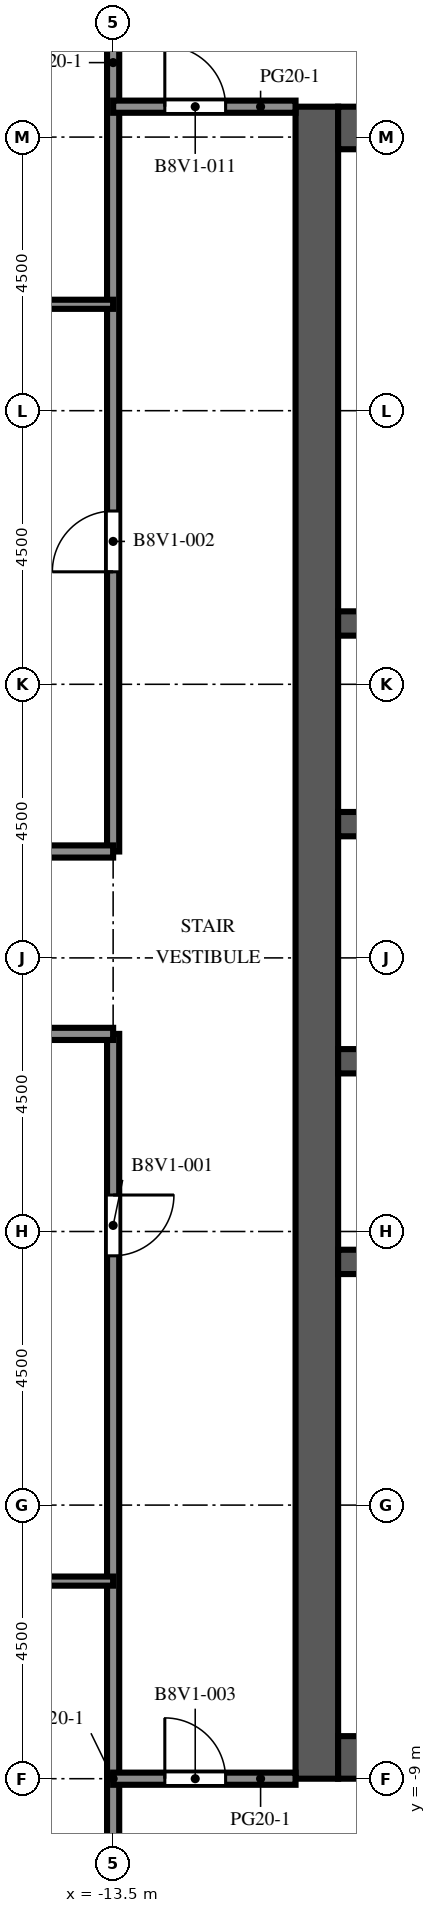
"""IFC4 building model, lengths in metres.
Left out: names, types, materials, properties, quantities, classifications, styles, units other than length and angle.
Written with IfcOpenShell. Run it as: python <this file> out.ifc"""

import sys

from ifc_helpers import new_model, si_unit, direction, frame, frame_2d, origin, place, context, subcontext, project, spatial, rectangle, extrude, element, fill, save


model = new_model("IFC4")
c1 = context("Model", 3, precision=1e-05, world=origin(), true_north=direction((0.0, 1.0)))
c2 = subcontext(c1, "Body", "Model", "MODEL_VIEW")
j1 = project(units=[si_unit("LENGTHUNIT", "METRE"), si_unit("PLANEANGLEUNIT", "RADIAN")], contexts=[c1])
p1 = place(None, origin())
s1 = spatial("IfcSite", under=j1, at=p1, CompositionType="ELEMENT")
p2 = place(p1, origin())
s2 = spatial("IfcBuilding", under=s1, at=p2, CompositionType="ELEMENT")
p3 = place(p2, frame((0.0, 0.0, 278.6)))
s3 = spatial("IfcBuildingStorey", under=s2, at=p3, CompositionType="ELEMENT", Elevation=278.6)
p4 = place(p3, frame((-10.15, -9.0, 0.0), z_axis=(0.0, 0.0, 1.0), x_axis=(0.0, 1.0, 0.0)))
e1 = element("IfcWall", 1, at=p4, inside=s3, PredefinedType="SHEAR", context=c2, shape_type="SweptSolid", body=[
    extrude(rectangle(XDim=27.5, YDim=0.7, at=frame_2d((13.75, 0.0))), origin(), (0.0, 0.0, 1.0), 4.1),
])
p5 = place(p4, frame((12.55, 0.0, 0.0)))
e2 = element("IfcOpeningElement", 2, at=p5, cuts=e1, PredefinedType="OPENING", context=c2, shape_type="SweptSolid", body=[
    extrude(rectangle(XDim=2.4, YDim=2.4, at=frame_2d((1.2, 1.2))), frame((0.0, 0.36, 0.0), z_axis=(0.0, -1.0, 0.0), x_axis=(1.0, 0.0, 0.0)), (0.0, 0.0, 1.0), 0.72),
])
p6 = place(p4, frame((6.825, 0.0, 0.0)))
e3 = element("IfcOpeningElement", 3, at=p6, cuts=e1, PredefinedType="OPENING", context=c2, shape_type="SweptSolid", body=[
    extrude(rectangle(XDim=1.2, YDim=2.1, at=frame_2d((0.6, 1.05))), frame((0.0, 0.36, 0.0), z_axis=(0.0, -1.0, 0.0), x_axis=(1.0, 0.0, 0.0)), (0.0, 0.0, 1.0), 0.72),
])
p7 = place(p4, frame((19.475, 0.0, 0.0)))
e4 = element("IfcOpeningElement", 4, at=p7, cuts=e1, PredefinedType="OPENING", context=c2, shape_type="SweptSolid", body=[
    extrude(rectangle(XDim=1.2, YDim=2.1, at=frame_2d((0.6, 1.05))), frame((0.0, 0.36, 0.0), z_axis=(0.0, -1.0, 0.0), x_axis=(1.0, 0.0, 0.0)), (0.0, 0.0, 1.0), 0.72),
])
for number, where, z_axis, x_axis in (
    (5, (-9.8, -8.65, 0.0), (0.0, 0.0, 1.0), (1.0, 0.0, 0.0)),
    (6, (-9.8, 18.15, 0.0), (0.0, 0.0, 1.0), (1.0, 0.0, 0.0)),
):
    element("IfcWall", number, at=place(p3, frame(where, z_axis=z_axis, x_axis=x_axis)), inside=s3, PredefinedType="SHEAR", context=c2, shape_type="SweptSolid", body=[
        extrude(rectangle(XDim=10.6, YDim=0.7, at=frame_2d((5.3, 0.0))), origin(), (0.0, 0.0, 1.0), 4.1),
    ])
p8 = place(p3, frame((-9.8, -0.5, 0.0), z_axis=(0.0, 0.0, 1.0), x_axis=(1.0, 0.0, 0.0)))
e7 = element("IfcWall", 7, at=p8, inside=s3, PredefinedType="SHEAR", context=c2, shape_type="SweptSolid", body=[
    extrude(rectangle(XDim=10.6, YDim=0.4, at=frame_2d((5.3, 0.0))), origin(), (0.0, 0.0, 1.0), 4.1),
])
p9 = place(p3, frame((-9.8, 2.8, 0.0), z_axis=(0.0, 0.0, 1.0), x_axis=(1.0, 0.0, 0.0)))
e8 = element("IfcWall", 8, at=p9, inside=s3, PredefinedType="SHEAR", context=c2, shape_type="SweptSolid", body=[
    extrude(rectangle(XDim=10.6, YDim=0.4, at=frame_2d((5.3, 0.0))), origin(), (0.0, 0.0, 1.0), 4.1),
])
p10 = place(p9, frame((0.688, 0.0, 0.0)))
e9 = element("IfcOpeningElement", 9, at=p10, cuts=e8, PredefinedType="OPENING", context=c2, shape_type="SweptSolid", body=[
    extrude(rectangle(XDim=1.1, YDim=2.1, at=frame_2d((0.55, 1.05))), frame((0.0, 0.21, 0.0), z_axis=(0.0, -1.0, 0.0), x_axis=(1.0, 0.0, 0.0)), (0.0, 0.0, 1.0), 0.42),
])
p11 = place(p9, frame((3.438, 0.0, 0.0)))
e10 = element("IfcOpeningElement", 10, at=p11, cuts=e8, PredefinedType="OPENING", context=c2, shape_type="SweptSolid", body=[
    extrude(rectangle(XDim=1.1, YDim=2.1, at=frame_2d((0.55, 1.05))), frame((0.0, 0.21, 0.0), z_axis=(0.0, -1.0, 0.0), x_axis=(1.0, 0.0, 0.0)), (0.0, 0.0, 1.0), 0.42),
])
p12 = place(p9, frame((6.113, 0.0, 0.0)))
e11 = element("IfcOpeningElement", 11, at=p12, cuts=e8, PredefinedType="OPENING", context=c2, shape_type="SweptSolid", body=[
    extrude(rectangle(XDim=1.0, YDim=2.1, at=frame_2d((0.5, 1.05))), frame((0.0, 0.21, 0.0), z_axis=(0.0, -1.0, 0.0), x_axis=(1.0, 0.0, 0.0)), (0.0, 0.0, 1.0), 0.42),
])
p13 = place(p9, frame((8.863, 0.0, 0.0)))
e12 = element("IfcOpeningElement", 12, at=p13, cuts=e8, PredefinedType="OPENING", context=c2, shape_type="SweptSolid", body=[
    extrude(rectangle(XDim=1.0, YDim=2.1, at=frame_2d((0.5, 1.05))), frame((0.0, 0.21, 0.0), z_axis=(0.0, -1.0, 0.0), x_axis=(1.0, 0.0, 0.0)), (0.0, 0.0, 1.0), 0.42),
])
p14 = place(p3, frame((-9.8, 6.7, 0.0), z_axis=(0.0, 0.0, 1.0), x_axis=(1.0, 0.0, 0.0)))
e13 = element("IfcWall", 13, at=p14, inside=s3, PredefinedType="SHEAR", context=c2, shape_type="SweptSolid", body=[
    extrude(rectangle(XDim=10.6, YDim=0.4, at=frame_2d((5.3, 0.0))), origin(), (0.0, 0.0, 1.0), 4.1),
])
p15 = place(p14, frame((3.438, 0.0, 0.0)))
e14 = element("IfcOpeningElement", 14, at=p15, cuts=e13, PredefinedType="OPENING", context=c2, shape_type="SweptSolid", body=[
    extrude(rectangle(XDim=1.1, YDim=2.1, at=frame_2d((0.55, 1.05))), frame((0.0, 0.21, 0.0), z_axis=(0.0, -1.0, 0.0), x_axis=(1.0, 0.0, 0.0)), (0.0, 0.0, 1.0), 0.42),
])
p16 = place(p14, frame((6.062, 0.0, 0.0)))
e15 = element("IfcOpeningElement", 15, at=p16, cuts=e13, PredefinedType="OPENING", context=c2, shape_type="SweptSolid", body=[
    extrude(rectangle(XDim=1.1, YDim=2.1, at=frame_2d((0.55, 1.05))), frame((0.0, 0.21, 0.0), z_axis=(0.0, -1.0, 0.0), x_axis=(1.0, 0.0, 0.0)), (0.0, 0.0, 1.0), 0.42),
])
p17 = place(p14, frame((8.812, 0.0, 0.0)))
e16 = element("IfcOpeningElement", 16, at=p17, cuts=e13, PredefinedType="OPENING", context=c2, shape_type="SweptSolid", body=[
    extrude(rectangle(XDim=1.1, YDim=2.1, at=frame_2d((0.55, 1.05))), frame((0.0, 0.21, 0.0), z_axis=(0.0, -1.0, 0.0), x_axis=(1.0, 0.0, 0.0)), (0.0, 0.0, 1.0), 0.42),
])
p18 = place(p14, frame((0.738, 0.0, 0.0)))
e17 = element("IfcOpeningElement", 17, at=p18, cuts=e13, PredefinedType="OPENING", context=c2, shape_type="SweptSolid", body=[
    extrude(rectangle(XDim=1.0, YDim=2.1, at=frame_2d((0.5, 1.05))), frame((0.0, 0.21, 0.0), z_axis=(0.0, -1.0, 0.0), x_axis=(1.0, 0.0, 0.0)), (0.0, 0.0, 1.0), 0.42),
])
p19 = place(p3, frame((-9.8, 10.0, 0.0), z_axis=(0.0, 0.0, 1.0), x_axis=(1.0, 0.0, 0.0)))
e18 = element("IfcWall", 18, at=p19, inside=s3, PredefinedType="SHEAR", context=c2, shape_type="SweptSolid", body=[
    extrude(rectangle(XDim=10.6, YDim=0.4, at=frame_2d((5.3, 0.0))), origin(), (0.0, 0.0, 1.0), 4.1),
])
p20 = place(p3, frame((-13.5, -17.6, 0.0), z_axis=(0.0, 0.0, 1.0), x_axis=(0.0, 1.0, 0.0)))
e19 = element("IfcWall", 19, at=p20, inside=s3, PredefinedType="PARTITIONING", context=c2, shape_type="SweptSolid", body=[
    extrude(rectangle(XDim=20.85, YDim=0.2, at=frame_2d((10.425, 0.0))), origin(), (0.0, 0.0, 1.0), 3.65),
])
p21 = place(p20, frame((17.2, 0.0, 0.0)))
e20 = element("IfcOpeningElement", 20, at=p21, cuts=e19, PredefinedType="OPENING", context=c2, shape_type="SweptSolid", body=[
    extrude(rectangle(XDim=1.0, YDim=2.1, at=frame_2d((0.5, 1.05))), frame((0.0, 0.11, 0.0), z_axis=(0.0, -1.0, 0.0), x_axis=(1.0, 0.0, 0.0)), (0.0, 0.0, 1.0), 0.22),
])
p22 = place(p3, frame((-13.5, 6.25, 0.0), z_axis=(0.0, 0.0, 1.0), x_axis=(0.0, 1.0, 0.0)))
e21 = element("IfcWall", 21, at=p22, inside=s3, PredefinedType="PARTITIONING", context=c2, shape_type="SweptSolid", body=[
    extrude(rectangle(XDim=20.35, YDim=0.2, at=frame_2d((10.175, 0.0))), origin(), (0.0, 0.0, 1.0), 3.65),
])
p23 = place(p22, frame((4.6, 0.0, 0.0)))
e22 = element("IfcOpeningElement", 22, at=p23, cuts=e21, PredefinedType="OPENING", context=c2, shape_type="SweptSolid", body=[
    extrude(rectangle(XDim=1.0, YDim=2.1, at=frame_2d((0.5, 1.05))), frame((0.0, 0.11, 0.0), z_axis=(0.0, -1.0, 0.0), x_axis=(1.0, 0.0, 0.0)), (0.0, 0.0, 1.0), 0.22),
])
p24 = place(p3, frame((-10.5, -9.0, 0.0), z_axis=(0.0, 0.0, 1.0), x_axis=(-1.0, 0.0, 0.0)))
e23 = element("IfcWall", 23, at=p24, inside=s3, PredefinedType="PARTITIONING", context=c2, shape_type="SweptSolid", body=[
    extrude(rectangle(XDim=3.0, YDim=0.2, at=frame_2d((1.5, 0.0))), origin(), (0.0, 0.0, 1.0), 3.65),
])
p25 = place(p24, frame((1.15, 0.0, 0.0)))
e24 = element("IfcOpeningElement", 24, at=p25, cuts=e23, PredefinedType="OPENING", context=c2, shape_type="SweptSolid", body=[
    extrude(rectangle(XDim=1.0, YDim=2.1, at=frame_2d((0.5, 1.05))), frame((0.0, 0.11, 0.0), z_axis=(0.0, -1.0, 0.0), x_axis=(1.0, 0.0, 0.0)), (0.0, 0.0, 1.0), 0.22),
])
p26 = place(p3, frame((-13.5, -5.75, 0.0), z_axis=(0.0, 0.0, 1.0), x_axis=(-1.0, 0.0, 0.0)))
e25 = element("IfcWall", 25, at=p26, inside=s3, PredefinedType="PARTITIONING", context=c2, shape_type="SweptSolid", body=[
    extrude(rectangle(XDim=8.85, YDim=0.15, at=frame_2d((4.425, 0.0))), origin(), (0.0, 0.0, 1.0), 3.65),
])
p27 = place(p26, frame((4.15, 0.0, 0.0)))
e26 = element("IfcOpeningElement", 26, at=p27, cuts=e25, PredefinedType="OPENING", context=c2, shape_type="SweptSolid", body=[
    extrude(rectangle(XDim=1.0, YDim=2.1, at=frame_2d((0.5, 1.05))), frame((0.0, 0.085, 0.0), z_axis=(0.0, -1.0, 0.0), x_axis=(1.0, 0.0, 0.0)), (0.0, 0.0, 1.0), 0.17),
])
for number, where, z_axis, x_axis in (
    (27, (-22.35, 3.25, 0.0), (0.0, 0.0, 1.0), (1.0, 0.0, 0.0)),
    (28, (-22.35, 6.25, 0.0), (0.0, 0.0, 1.0), (1.0, 0.0, 0.0)),
):
    element("IfcWall", number, at=place(p3, frame(where, z_axis=z_axis, x_axis=x_axis)), inside=s3, PredefinedType="PARTITIONING", context=c2, shape_type="SweptSolid", body=[
        extrude(rectangle(XDim=8.85, YDim=0.2, at=frame_2d((4.425, 0.0))), origin(), (0.0, 0.0, 1.0), 3.65),
    ])
p28 = place(p3, frame((-22.35, 15.25, 0.0), z_axis=(0.0, 0.0, 1.0), x_axis=(1.0, 0.0, 0.0)))
e29 = element("IfcWall", 29, at=p28, inside=s3, PredefinedType="PARTITIONING", context=c2, shape_type="SweptSolid", body=[
    extrude(rectangle(XDim=8.85, YDim=0.15, at=frame_2d((4.425, 0.0))), origin(), (0.0, 0.0, 1.0), 3.65),
])
p29 = place(p28, frame((2.7, 0.0, 0.0)))
e30 = element("IfcOpeningElement", 30, at=p29, cuts=e29, PredefinedType="OPENING", context=c2, shape_type="SweptSolid", body=[
    extrude(rectangle(XDim=1.0, YDim=2.1, at=frame_2d((0.5, 1.05))), frame((0.0, 0.085, 0.0), z_axis=(0.0, -1.0, 0.0), x_axis=(1.0, 0.0, 0.0)), (0.0, 0.0, 1.0), 0.17),
])
p30 = place(p3, frame((-13.5, 18.5, 0.0), z_axis=(0.0, 0.0, 1.0), x_axis=(1.0, 0.0, 0.0)))
e31 = element("IfcWall", 31, at=p30, inside=s3, PredefinedType="PARTITIONING", context=c2, shape_type="SweptSolid", body=[
    extrude(rectangle(XDim=3.0, YDim=0.2, at=frame_2d((1.5, 0.0))), origin(), (0.0, 0.0, 1.0), 3.65),
])
p31 = place(p30, frame((0.85, 0.0, 0.0)))
e32 = element("IfcOpeningElement", 32, at=p31, cuts=e31, PredefinedType="OPENING", context=c2, shape_type="SweptSolid", body=[
    extrude(rectangle(XDim=1.0, YDim=2.1, at=frame_2d((0.5, 1.05))), frame((0.0, 0.11, 0.0), z_axis=(0.0, -1.0, 0.0), x_axis=(1.0, 0.0, 0.0)), (0.0, 0.0, 1.0), 0.22),
])
p32 = place(p5, origin())
e33 = element("IfcDoor", 33, at=p32, inside=s3, OperationType="DOUBLE_DOOR_DOUBLE_SWING", PredefinedType="DOOR", context=c2, shape_type="SweptSolid", body=[
    extrude(rectangle(XDim=2.4, YDim=2.4, at=frame_2d((1.2, 1.2))), frame((0.0, 0.025, 0.0), z_axis=(0.0, -1.0, 0.0), x_axis=(1.0, 0.0, 0.0)), (0.0, 0.0, 1.0), 0.05),
])
fill(e2, e33)
p33 = place(p6, origin())
e34 = element("IfcDoor", 34, at=p33, inside=s3, OperationType="SINGLE_SWING_LEFT", PredefinedType="DOOR", context=c2, shape_type="SweptSolid", body=[
    extrude(rectangle(XDim=1.2, YDim=2.1, at=frame_2d((0.6, 1.05))), frame((0.0, 0.025, 0.0), z_axis=(0.0, -1.0, 0.0), x_axis=(1.0, 0.0, 0.0)), (0.0, 0.0, 1.0), 0.05),
])
fill(e3, e34)
p34 = place(p7, origin())
e35 = element("IfcDoor", 35, at=p34, inside=s3, OperationType="SINGLE_SWING_LEFT", PredefinedType="DOOR", context=c2, shape_type="SweptSolid", body=[
    extrude(rectangle(XDim=1.2, YDim=2.1, at=frame_2d((0.6, 1.05))), frame((0.0, 0.025, 0.0), z_axis=(0.0, -1.0, 0.0), x_axis=(1.0, 0.0, 0.0)), (0.0, 0.0, 1.0), 0.05),
])
fill(e4, e35)
p35 = place(p21, origin())
e36 = element("IfcDoor", 36, at=p35, inside=s3, OperationType="SINGLE_SWING_RIGHT", PredefinedType="DOOR", context=c2, shape_type="SweptSolid", body=[
    extrude(rectangle(XDim=1.0, YDim=2.1, at=frame_2d((0.5, 1.05))), frame((0.0, 0.025, 0.0), z_axis=(0.0, -1.0, 0.0), x_axis=(1.0, 0.0, 0.0)), (0.0, 0.0, 1.0), 0.05),
])
fill(e20, e36)
p36 = place(p23, origin())
e37 = element("IfcDoor", 37, at=p36, inside=s3, OperationType="SINGLE_SWING_LEFT", PredefinedType="DOOR", context=c2, shape_type="SweptSolid", body=[
    extrude(rectangle(XDim=1.0, YDim=2.1, at=frame_2d((0.5, 1.05))), frame((0.0, 0.025, 0.0), z_axis=(0.0, -1.0, 0.0), x_axis=(1.0, 0.0, 0.0)), (0.0, 0.0, 1.0), 0.05),
])
fill(e22, e37)
p37 = place(p25, origin())
e38 = element("IfcDoor", 38, at=p37, inside=s3, OperationType="SINGLE_SWING_RIGHT", PredefinedType="DOOR", context=c2, shape_type="SweptSolid", body=[
    extrude(rectangle(XDim=1.0, YDim=2.1, at=frame_2d((0.5, 1.05))), frame((0.0, 0.025, 0.0), z_axis=(0.0, -1.0, 0.0), x_axis=(1.0, 0.0, 0.0)), (0.0, 0.0, 1.0), 0.05),
])
fill(e24, e38)
p38 = place(p31, origin())
e39 = element("IfcDoor", 39, at=p38, inside=s3, OperationType="SINGLE_SWING_LEFT", PredefinedType="DOOR", context=c2, shape_type="SweptSolid", body=[
    extrude(rectangle(XDim=1.0, YDim=2.1, at=frame_2d((0.5, 1.05))), frame((0.0, 0.025, 0.0), z_axis=(0.0, -1.0, 0.0), x_axis=(1.0, 0.0, 0.0)), (0.0, 0.0, 1.0), 0.05),
])
fill(e32, e39)
save(model, sys.argv[1])
